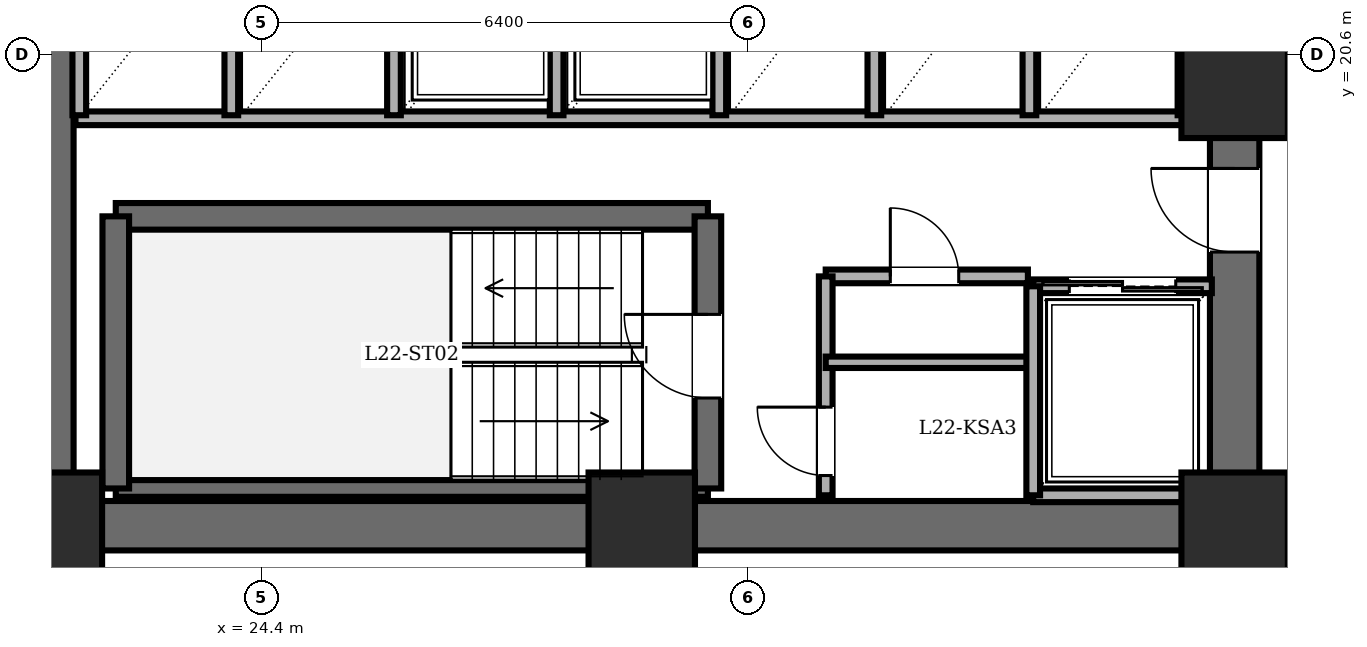
"""IFC4 building model, lengths in metres.
Left out: names, types, materials, properties, quantities, classifications, styles, units other than length and angle.
Written with IfcOpenShell. Run it as: python <this file> out.ifc"""

import sys

from ifc_helpers import new_model, si_unit, direction, frame, frame_2d, origin, origin_2d, place, context, subcontext, project, spatial, rectangle, extrude, element, fill, save


model = new_model("IFC4")
c1 = context("Model", 3, precision=1e-05, world=origin(), true_north=direction((0.0, 1.0)))
c2 = subcontext(c1, "Body", "Model", "MODEL_VIEW")
j1 = project(units=[si_unit("LENGTHUNIT", "METRE"), si_unit("PLANEANGLEUNIT", "RADIAN")], contexts=[c1])
p1 = place(None, origin())
s1 = spatial("IfcSite", under=j1, at=p1, CompositionType="ELEMENT")
p2 = place(p1, origin())
s2 = spatial("IfcBuilding", under=s1, at=p2, CompositionType="ELEMENT")
p3 = place(p2, frame((0.0, 0.0, 86.3)))
s3 = spatial("IfcBuildingStorey", under=s2, at=p3, CompositionType="ELEMENT", Elevation=86.3)
for number, where, z_axis, x_axis in (
    (1, (21.6, 14.4, 0.0), (0.0, 0.0, 1.0), (1.0, 0.0, 0.0)),
    (2, (29.4, 14.4, 0.0), (0.0, 0.0, 1.0), (1.0, 0.0, 0.0)),
    (3, (37.2, 14.4, 0.0), (0.0, 0.0, 1.0), (1.0, 0.0, 0.0)),
    (4, (37.2, 20.2, 0.0), (0.0, 0.0, 1.0), (1.0, 0.0, 0.0)),
):
    element("IfcColumn", number, at=place(p3, frame(where, z_axis=z_axis, x_axis=x_axis)), inside=s3, PredefinedType="COLUMN", context=c2, shape_type="SweptSolid", body=[
        extrude(rectangle(XDim=1.4, YDim=1.4, at=origin_2d()), origin(), (0.0, 0.0, 1.0), 3.6),
    ])
p4 = place(p3, frame((21.6, 14.4, 0.0), z_axis=(0.0, 0.0, 1.0), x_axis=(0.0, 1.0, 0.0)))
e5 = element("IfcWall", 5, at=p4, inside=s3, PredefinedType="SHEAR", context=c2, shape_type="SweptSolid", body=[
    extrude(rectangle(XDim=19.2, YDim=0.65, at=frame_2d((9.6, 0.0))), origin(), (0.0, 0.0, 1.0), 3.4),
])
p5 = place(p3, frame((37.2, 14.4, 0.0), z_axis=(0.0, 0.0, 1.0), x_axis=(-1.0, 0.0, 0.0)))
e6 = element("IfcWall", 6, at=p5, inside=s3, PredefinedType="SHEAR", context=c2, shape_type="SweptSolid", body=[
    extrude(rectangle(XDim=15.6, YDim=0.65, at=frame_2d((7.8, 0.0))), origin(), (0.0, 0.0, 1.0), 3.4),
])
p6 = place(p3, frame((37.2, 14.4, 0.0), z_axis=(0.0, 0.0, 1.0), x_axis=(0.0, 1.0, 0.0)))
e7 = element("IfcWall", 7, at=p6, inside=s3, PredefinedType="SHEAR", context=c2, shape_type="SweptSolid", body=[
    extrude(rectangle(XDim=19.2, YDim=0.65, at=frame_2d((9.6, 0.0))), origin(), (0.0, 0.0, 1.0), 3.4),
])
p7 = place(p6, frame((15.8, 0.0, 0.0)))
e8 = element("IfcOpeningElement", 8, at=p7, cuts=e7, PredefinedType="OPENING", context=c2, shape_type="SweptSolid", body=[
    extrude(rectangle(XDim=1.15, YDim=2.15, at=frame_2d((0.575, 1.075))), frame((0.0, 0.335, 0.0), z_axis=(0.0, -1.0, 0.0), x_axis=(1.0, 0.0, 0.0)), (0.0, 0.0, 1.0), 0.67),
])
p8 = place(p6, frame((3.6, 0.0, 0.0)))
e9 = element("IfcOpeningElement", 9, at=p8, cuts=e7, PredefinedType="OPENING", context=c2, shape_type="SweptSolid", body=[
    extrude(rectangle(XDim=1.1, YDim=2.15, at=frame_2d((0.55, 1.075))), frame((0.0, 0.335, 0.0), z_axis=(0.0, -1.0, 0.0), x_axis=(1.0, 0.0, 0.0)), (0.0, 0.0, 1.0), 0.67),
])
p9 = place(p6, frame((8.6, 0.0, 0.0)))
e10 = element("IfcOpeningElement", 10, at=p9, cuts=e7, PredefinedType="OPENING", context=c2, shape_type="SweptSolid", body=[
    extrude(rectangle(XDim=1.3, YDim=2.2, at=frame_2d((0.65, 1.1))), frame((0.0, 0.335, 0.0), z_axis=(0.0, -1.0, 0.0), x_axis=(1.0, 0.0, 0.0)), (0.0, 0.0, 1.0), 0.67),
])
p10 = place(p3, frame((22.48, 18.47, 0.0), z_axis=(0.0, 0.0, 1.0), x_axis=(1.0, 0.0, 0.0)))
e11 = element("IfcWall", 11, at=p10, inside=s3, PredefinedType="SOLIDWALL", context=c2, shape_type="SweptSolid", body=[
    extrude(rectangle(XDim=7.79, YDim=0.35, at=frame_2d((3.895, 0.0))), origin(), (0.0, 0.0, 1.0), 3.4),
])
p11 = place(p3, frame((22.48, 14.89, 0.0), z_axis=(0.0, 0.0, 1.0), x_axis=(1.0, 0.0, 0.0)))
e12 = element("IfcWall", 12, at=p11, inside=s3, PredefinedType="PARTITIONING", context=c2, shape_type="SweptSolid", body=[
    extrude(rectangle(XDim=7.79, YDim=0.22, at=frame_2d((3.895, 0.0))), origin(), (0.0, 0.0, 1.0), 3.4),
])
p12 = place(p3, frame((22.48, 14.89, 0.0), z_axis=(0.0, 0.0, 1.0), x_axis=(0.0, 1.0, 0.0)))
e13 = element("IfcWall", 13, at=p12, inside=s3, PredefinedType="SOLIDWALL", context=c2, shape_type="SweptSolid", body=[
    extrude(rectangle(XDim=3.58, YDim=0.35, at=frame_2d((1.79, 0.0))), origin(), (0.0, 0.0, 1.0), 3.4),
])
p13 = place(p3, frame((30.27, 14.89, 0.0), z_axis=(0.0, 0.0, 1.0), x_axis=(0.0, 1.0, 0.0)))
e14 = element("IfcWall", 14, at=p13, inside=s3, PredefinedType="SOLIDWALL", context=c2, shape_type="SweptSolid", body=[
    extrude(rectangle(XDim=3.58, YDim=0.35, at=frame_2d((1.79, 0.0))), origin(), (0.0, 0.0, 1.0), 3.4),
])
p14 = place(p13, frame((1.19, 0.0, 0.0)))
e15 = element("IfcOpeningElement", 15, at=p14, cuts=e14, PredefinedType="OPENING", context=c2, shape_type="SweptSolid", body=[
    extrude(rectangle(XDim=1.1, YDim=2.15, at=frame_2d((0.55, 1.075))), frame((0.0, 0.185, 0.0), z_axis=(0.0, -1.0, 0.0), x_axis=(1.0, 0.0, 0.0)), (0.0, 0.0, 1.0), 0.37),
])
p15 = place(p3, frame((21.95, 19.76, 0.0), z_axis=(0.0, 0.0, 1.0), x_axis=(1.0, 0.0, 0.0)))
e16 = element("IfcWall", 16, at=p15, inside=s3, PredefinedType="PARTITIONING", context=c2, shape_type="SweptSolid", body=[
    extrude(rectangle(XDim=14.87, YDim=0.18, at=frame_2d((7.435, 0.0))), origin(), (0.0, 0.0, 1.0), 3.4),
])
p16 = place(p3, frame((31.82, 17.68, 0.0), z_axis=(0.0, 0.0, 1.0), x_axis=(1.0, 0.0, 0.0)))
e17 = element("IfcWall", 17, at=p16, inside=s3, PredefinedType="PARTITIONING", context=c2, shape_type="SweptSolid", body=[
    extrude(rectangle(XDim=2.66, YDim=0.18, at=frame_2d((1.33, 0.0))), origin(), (0.0, 0.0, 1.0), 3.4),
])
p17 = place(p16, frame((0.85, 0.0, 0.0)))
e18 = element("IfcOpeningElement", 18, at=p17, cuts=e17, PredefinedType="OPENING", context=c2, shape_type="SweptSolid", body=[
    extrude(rectangle(XDim=0.9, YDim=2.05, at=frame_2d((0.45, 1.025))), frame((0.0, 0.1, 0.0), z_axis=(0.0, -1.0, 0.0), x_axis=(1.0, 0.0, 0.0)), (0.0, 0.0, 1.0), 0.2),
])
p18 = place(p3, frame((31.82, 14.8, 0.0), z_axis=(0.0, 0.0, 1.0), x_axis=(0.0, 1.0, 0.0)))
e19 = element("IfcWall", 19, at=p18, inside=s3, PredefinedType="PARTITIONING", context=c2, shape_type="SweptSolid", body=[
    extrude(rectangle(XDim=2.88, YDim=0.18, at=frame_2d((1.44, 0.0))), origin(), (0.0, 0.0, 1.0), 3.4),
])
p19 = place(p18, frame((0.26, 0.0, 0.0)))
e20 = element("IfcOpeningElement", 20, at=p19, cuts=e19, PredefinedType="OPENING", context=c2, shape_type="SweptSolid", body=[
    extrude(rectangle(XDim=0.9, YDim=2.05, at=frame_2d((0.45, 1.025))), frame((0.0, 0.1, 0.0), z_axis=(0.0, -1.0, 0.0), x_axis=(1.0, 0.0, 0.0)), (0.0, 0.0, 1.0), 0.2),
])
p20 = place(p3, frame((31.82, 16.55, 0.0), z_axis=(0.0, 0.0, 1.0), x_axis=(1.0, 0.0, 0.0)))
e21 = element("IfcWall", 21, at=p20, inside=s3, PredefinedType="PARTITIONING", context=c2, shape_type="SweptSolid", body=[
    extrude(rectangle(XDim=2.66, YDim=0.15, at=frame_2d((1.33, 0.0))), origin(), (0.0, 0.0, 1.0), 3.4),
])
p21 = place(p3, frame((34.55, 17.55, 0.0), z_axis=(0.0, 0.0, 1.0), x_axis=(1.0, 0.0, 0.0)))
e22 = element("IfcWall", 22, at=p21, inside=s3, PredefinedType="PARTITIONING", context=c2, shape_type="SweptSolid", body=[
    extrude(rectangle(XDim=2.35, YDim=0.18, at=frame_2d((1.175, 0.0))), origin(), (0.0, 0.0, 1.0), 3.4),
])
p22 = place(p21, frame((0.475, 0.0, 0.0)))
e23 = element("IfcOpeningElement", 23, at=p22, cuts=e22, PredefinedType="OPENING", context=c2, shape_type="SweptSolid", body=[
    extrude(rectangle(XDim=1.4, YDim=2.3, at=frame_2d((0.7, 1.15))), frame((0.0, 0.1, 0.0), z_axis=(0.0, -1.0, 0.0), x_axis=(1.0, 0.0, 0.0)), (0.0, 0.0, 1.0), 0.2),
])
p23 = place(p3, frame((36.9, 14.8, 0.0), z_axis=(0.0, 0.0, 1.0), x_axis=(-1.0, 0.0, 0.0)))
e24 = element("IfcWall", 24, at=p23, inside=s3, PredefinedType="PARTITIONING", context=c2, shape_type="SweptSolid", body=[
    extrude(rectangle(XDim=2.35, YDim=0.18, at=frame_2d((1.175, 0.0))), origin(), (0.0, 0.0, 1.0), 3.4),
])
p24 = place(p3, frame((34.55, 17.55, 0.0), z_axis=(0.0, 0.0, 1.0), x_axis=(0.0, -1.0, 0.0)))
e25 = element("IfcWall", 25, at=p24, inside=s3, PredefinedType="PARTITIONING", context=c2, shape_type="SweptSolid", body=[
    extrude(rectangle(XDim=2.75, YDim=0.18, at=frame_2d((1.375, 0.0))), origin(), (0.0, 0.0, 1.0), 3.4),
])
for number, where, z_axis, x_axis in (
    (26, (24.0, 19.8, 0.0), (0.0, 0.0, 1.0), (0.0, 1.0, 0.0)),
    (27, (22.0, 22.3, 0.0), (0.0, 0.0, 1.0), (0.0, -1.0, 0.0)),
    (28, (26.14, 19.8, 0.0), (0.0, 0.0, 1.0), (0.0, 1.0, 0.0)),
    (29, (28.28, 19.8, 0.0), (0.0, 0.0, 1.0), (0.0, 1.0, 0.0)),
    (30, (30.42, 19.8, 0.0), (0.0, 0.0, 1.0), (0.0, 1.0, 0.0)),
    (31, (32.46, 19.8, 0.0), (0.0, 0.0, 1.0), (0.0, 1.0, 0.0)),
    (32, (34.5, 19.8, 0.0), (0.0, 0.0, 1.0), (0.0, 1.0, 0.0)),
    (33, (36.54, 19.8, 0.0), (0.0, 0.0, 1.0), (0.0, 1.0, 0.0)),
):
    element("IfcWall", number, at=place(p3, frame(where, z_axis=z_axis, x_axis=x_axis)), inside=s3, PredefinedType="PARTITIONING", context=c2, shape_type="SweptSolid", body=[
        extrude(rectangle(XDim=2.5, YDim=0.18, at=frame_2d((1.25, 0.0))), origin(), (0.0, 0.0, 1.0), 3.4),
    ])
p25 = place(p14, origin())
e34 = element("IfcDoor", 34, at=p25, inside=s3, OperationType="SINGLE_SWING_RIGHT", PredefinedType="DOOR", context=c2, shape_type="SweptSolid", body=[
    extrude(rectangle(XDim=1.1, YDim=2.15, at=frame_2d((0.55, 1.075))), frame((0.0, 0.025, 0.0), z_axis=(0.0, -1.0, 0.0), x_axis=(1.0, 0.0, 0.0)), (0.0, 0.0, 1.0), 0.05),
])
fill(e15, e34)
p26 = place(p8, origin())
e35 = element("IfcDoor", 35, at=p26, inside=s3, OperationType="SINGLE_SWING_RIGHT", PredefinedType="DOOR", context=c2, shape_type="SweptSolid", body=[
    extrude(rectangle(XDim=1.1, YDim=2.15, at=frame_2d((0.55, 1.075))), frame((0.0, 0.025, 0.0), z_axis=(0.0, -1.0, 0.0), x_axis=(1.0, 0.0, 0.0)), (0.0, 0.0, 1.0), 0.05),
])
fill(e9, e35)
p27 = place(p17, origin())
e36 = element("IfcDoor", 36, at=p27, inside=s3, OperationType="SINGLE_SWING_LEFT", PredefinedType="DOOR", context=c2, shape_type="SweptSolid", body=[
    extrude(rectangle(XDim=0.9, YDim=2.05, at=frame_2d((0.45, 1.025))), frame((0.0, 0.025, 0.0), z_axis=(0.0, -1.0, 0.0), x_axis=(1.0, 0.0, 0.0)), (0.0, 0.0, 1.0), 0.05),
])
fill(e18, e36)
p28 = place(p19, origin())
e37 = element("IfcDoor", 37, at=p28, inside=s3, OperationType="SINGLE_SWING_RIGHT", PredefinedType="DOOR", context=c2, shape_type="SweptSolid", body=[
    extrude(rectangle(XDim=0.9, YDim=2.05, at=frame_2d((0.45, 1.025))), frame((0.0, 0.025, 0.0), z_axis=(0.0, -1.0, 0.0), x_axis=(1.0, 0.0, 0.0)), (0.0, 0.0, 1.0), 0.05),
])
fill(e20, e37)
p29 = place(p22, origin())
e38 = element("IfcDoor", 38, at=p29, inside=s3, OperationType="DOUBLE_DOOR_SLIDING", PredefinedType="DOOR", context=c2, shape_type="SweptSolid", body=[
    extrude(rectangle(XDim=1.4, YDim=2.3, at=frame_2d((0.7, 1.15))), frame((0.0, 0.025, 0.0), z_axis=(0.0, -1.0, 0.0), x_axis=(1.0, 0.0, 0.0)), (0.0, 0.0, 1.0), 0.05),
])
fill(e23, e38)
save(model, sys.argv[1])
